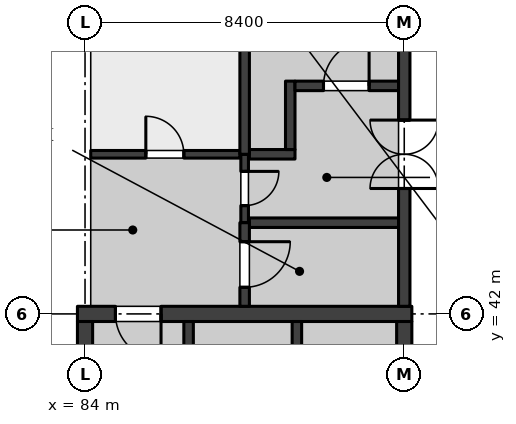
"""IFC4 building model, lengths in metres.
Left out: names, types, materials, properties, quantities, classifications, styles, units other than length and angle.
Written with IfcOpenShell. Run it as: python <this file> out.ifc"""

import sys

from ifc_helpers import new_model, si_unit, direction, frame, frame_2d, origin, place, context, subcontext, project, spatial, rectangle, extrude, element, fill, save


model = new_model("IFC4")
c1 = context("Model", 3, precision=1e-05, world=origin(), true_north=direction((0.0, 1.0)))
c2 = subcontext(c1, "Body", "Model", "MODEL_VIEW")
j1 = project(units=[si_unit("LENGTHUNIT", "METRE"), si_unit("PLANEANGLEUNIT", "RADIAN")], contexts=[c1])
p1 = place(None, origin())
s1 = spatial("IfcSite", under=j1, at=p1, CompositionType="ELEMENT")
p2 = place(p1, origin())
s2 = spatial("IfcBuilding", under=s1, at=p2, CompositionType="ELEMENT")
p3 = place(p2, frame((0.0, 0.0, 5.4)))
s3 = spatial("IfcBuildingStorey", under=s2, at=p3, CompositionType="ELEMENT", Elevation=5.4)
p4 = place(p3, frame((83.8, 42.0, 0.0), z_axis=(0.0, 0.0, 1.0), x_axis=(1.0, 0.0, 0.0)))
e1 = element("IfcWall", 1, at=p4, inside=s3, PredefinedType="SHEAR", context=c2, shape_type="SweptSolid", body=[
    extrude(rectangle(XDim=8.8, YDim=0.4, at=frame_2d((4.4, 0.0))), origin(), (0.0, 0.0, 1.0), 4.25),
])
p5 = place(p4, frame((1.0, 0.0, 0.0)))
e2 = element("IfcOpeningElement", 2, at=p5, cuts=e1, PredefinedType="OPENING", context=c2, shape_type="SweptSolid", body=[
    extrude(rectangle(XDim=1.2, YDim=2.1, at=frame_2d((0.6, 1.05))), frame((0.0, 0.21, 0.0), z_axis=(0.0, -1.0, 0.0), x_axis=(1.0, 0.0, 0.0)), (0.0, 0.0, 1.0), 0.42),
])
for number, where, z_axis, x_axis in (
    (3, (84.0, 33.8, 0.0), (0.0, 0.0, 1.0), (0.0, 1.0, 0.0)),
    (4, (92.4, 33.8, 0.0), (0.0, 0.0, 1.0), (0.0, 1.0, 0.0)),
):
    element("IfcWall", number, at=place(p3, frame(where, z_axis=z_axis, x_axis=x_axis)), inside=s3, PredefinedType="SHEAR", context=c2, shape_type="SweptSolid", body=[
        extrude(rectangle(XDim=8.0, YDim=0.4, at=frame_2d((4.0, 0.0))), origin(), (0.0, 0.0, 1.0), 4.25),
    ])
p6 = place(p3, frame((86.725, 39.0, 0.0), z_axis=(0.0, 0.0, 1.0), x_axis=(0.0, 1.0, 0.0)))
e5 = element("IfcWall", 5, at=p6, inside=s3, PredefinedType="SOLIDWALL", context=c2, shape_type="SweptSolid", body=[
    extrude(rectangle(XDim=2.8, YDim=0.25, at=frame_2d((1.4, 0.0))), origin(), (0.0, 0.0, 1.0), 4.25),
])
p7 = place(p3, frame((89.575, 39.25, 0.0), z_axis=(0.0, 0.0, 1.0), x_axis=(0.0, 1.0, 0.0)))
e6 = element("IfcWall", 6, at=p7, inside=s3, PredefinedType="SOLIDWALL", context=c2, shape_type="SweptSolid", body=[
    extrude(rectangle(XDim=2.55, YDim=0.25, at=frame_2d((1.275, 0.0))), origin(), (0.0, 0.0, 1.0), 4.25),
])
p8 = place(p2, origin())
s4 = spatial("IfcBuildingStorey", under=s2, at=p8, CompositionType="ELEMENT", Elevation=0.0)
p9 = place(p8, frame((84.0, 42.2, 0.0), z_axis=(0.0, 0.0, 1.0), x_axis=(0.0, 1.0, 0.0)))
e7 = element("IfcWall", 7, at=p9, inside=s4, PredefinedType="PARTITIONING", context=c2, shape_type="SweptSolid", body=[
    extrude(rectangle(XDim=4.0, YDim=0.2, at=frame_2d((2.0, 0.0))), origin(), (0.0, 0.0, 1.0), 18.77),
])
p10 = place(p9, frame((1.5, 0.0, 0.0)))
e8 = element("IfcOpeningElement", 8, at=p10, cuts=e7, PredefinedType="OPENING", context=c2, shape_type="SweptSolid", body=[
    extrude(rectangle(XDim=1.0, YDim=2.4, at=frame_2d((0.5, 1.2))), frame((0.0, 0.11, 0.0), z_axis=(0.0, -1.0, 0.0), x_axis=(1.0, 0.0, 0.0)), (0.0, 0.0, 1.0), 0.22),
])
p11 = place(p8, frame((84.0, 46.2, 0.0), z_axis=(0.0, 0.0, 1.0), x_axis=(0.0, 1.0, 0.0)))
e9 = element("IfcWall", 9, at=p11, inside=s4, PredefinedType="PARTITIONING", context=c2, shape_type="SweptSolid", body=[
    extrude(rectangle(XDim=2.4, YDim=0.125, at=frame_2d((1.2, 0.0))), origin(), (0.0, 0.0, 1.0), 18.77),
])
p12 = place(p8, frame((84.0, 48.6, 0.0), z_axis=(0.0, 0.0, 1.0), x_axis=(0.0, 1.0, 0.0)))
e10 = element("IfcWall", 10, at=p12, inside=s4, PredefinedType="PARTITIONING", context=c2, shape_type="SweptSolid", body=[
    extrude(rectangle(XDim=1.35, YDim=0.125, at=frame_2d((0.675, 0.0))), origin(), (0.0, 0.0, 1.0), 18.77),
])
p13 = place(p3, frame((88.2, 44.4, 0.0), z_axis=(0.0, 0.0, 1.0), x_axis=(0.0, 1.0, 0.0)))
e11 = element("IfcWall", 11, at=p13, inside=s3, PredefinedType="PARTITIONING", context=c2, shape_type="SweptSolid", body=[
    extrude(rectangle(XDim=1.8, YDim=0.2, at=frame_2d((0.9, 0.0))), origin(), (0.0, 0.0, 1.0), 4.25),
])
p14 = place(p13, frame((0.45, 0.0, 0.0)))
e12 = element("IfcOpeningElement", 12, at=p14, cuts=e11, PredefinedType="OPENING", context=c2, shape_type="SweptSolid", body=[
    extrude(rectangle(XDim=0.9, YDim=2.1, at=frame_2d((0.45, 1.05))), frame((0.0, 0.11, 0.0), z_axis=(0.0, -1.0, 0.0), x_axis=(1.0, 0.0, 0.0)), (0.0, 0.0, 1.0), 0.22),
])
p15 = place(p3, frame((88.325, 46.2, 0.0), z_axis=(0.0, 0.0, 1.0), x_axis=(1.0, 0.0, 0.0)))
e13 = element("IfcWall", 13, at=p15, inside=s3, PredefinedType="PARTITIONING", context=c2, shape_type="SweptSolid", body=[
    extrude(rectangle(XDim=1.2, YDim=0.25, at=frame_2d((0.6, 0.0))), origin(), (0.0, 0.0, 1.0), 4.25),
])
p16 = place(p3, frame((89.4, 46.325, 0.0), z_axis=(0.0, 0.0, 1.0), x_axis=(0.0, 1.0, 0.0)))
e14 = element("IfcWall", 14, at=p16, inside=s3, PredefinedType="PARTITIONING", context=c2, shape_type="SweptSolid", body=[
    extrude(rectangle(XDim=1.8, YDim=0.25, at=frame_2d((0.9, 0.0))), origin(), (0.0, 0.0, 1.0), 4.25),
])
p17 = place(p3, frame((89.525, 48.0, 0.0), z_axis=(0.0, 0.0, 1.0), x_axis=(1.0, 0.0, 0.0)))
e15 = element("IfcWall", 15, at=p17, inside=s3, PredefinedType="PARTITIONING", context=c2, shape_type="SweptSolid", body=[
    extrude(rectangle(XDim=2.725, YDim=0.25, at=frame_2d((1.363, 0.0))), origin(), (0.0, 0.0, 1.0), 4.25),
])
p18 = place(p17, frame((0.75, 0.0, 0.0)))
e16 = element("IfcOpeningElement", 16, at=p18, cuts=e15, PredefinedType="OPENING", context=c2, shape_type="SweptSolid", body=[
    extrude(rectangle(XDim=1.2, YDim=2.4, at=frame_2d((0.6, 1.2))), frame((0.0, 0.135, 0.0), z_axis=(0.0, -1.0, 0.0), x_axis=(1.0, 0.0, 0.0)), (0.0, 0.0, 1.0), 0.27),
])
p19 = place(p3, frame((88.325, 44.4, 0.0), z_axis=(0.0, 0.0, 1.0), x_axis=(1.0, 0.0, 0.0)))
e17 = element("IfcWall", 17, at=p19, inside=s3, PredefinedType="PARTITIONING", context=c2, shape_type="SweptSolid", body=[
    extrude(rectangle(XDim=3.925, YDim=0.25, at=frame_2d((1.962, 0.0))), origin(), (0.0, 0.0, 1.0), 4.25),
])
p20 = place(p3, frame((88.2, 42.2, 0.0), z_axis=(0.0, 0.0, 1.0), x_axis=(0.0, 1.0, 0.0)))
e18 = element("IfcWall", 18, at=p20, inside=s3, PredefinedType="PARTITIONING", context=c2, shape_type="SweptSolid", body=[
    extrude(rectangle(XDim=2.2, YDim=0.25, at=frame_2d((1.1, 0.0))), origin(), (0.0, 0.0, 1.0), 4.25),
])
p21 = place(p20, frame((0.5, 0.0, 0.0)))
e19 = element("IfcOpeningElement", 19, at=p21, cuts=e18, PredefinedType="OPENING", context=c2, shape_type="SweptSolid", body=[
    extrude(rectangle(XDim=1.2, YDim=2.4, at=frame_2d((0.6, 1.2))), frame((0.0, 0.135, 0.0), z_axis=(0.0, -1.0, 0.0), x_axis=(1.0, 0.0, 0.0)), (0.0, 0.0, 1.0), 0.27),
])
p22 = place(p3, frame((84.15, 46.2, 0.0), z_axis=(0.0, 0.0, 1.0), x_axis=(1.0, 0.0, 0.0)))
e20 = element("IfcWall", 20, at=p22, inside=s3, PredefinedType="PARTITIONING", context=c2, shape_type="SweptSolid", body=[
    extrude(rectangle(XDim=3.925, YDim=0.2, at=frame_2d((1.962, 0.0))), origin(), (0.0, 0.0, 1.0), 4.25),
])
p23 = place(p22, frame((1.45, 0.0, 0.0)))
e21 = element("IfcOpeningElement", 21, at=p23, cuts=e20, PredefinedType="OPENING", context=c2, shape_type="SweptSolid", body=[
    extrude(rectangle(XDim=1.0, YDim=2.4, at=frame_2d((0.5, 1.2))), frame((0.0, 0.11, 0.0), z_axis=(0.0, -1.0, 0.0), x_axis=(1.0, 0.0, 0.0)), (0.0, 0.0, 1.0), 0.22),
])
p24 = place(p3, frame((88.2, 46.2, 0.0), z_axis=(0.0, 0.0, 1.0), x_axis=(0.0, 1.0, 0.0)))
e22 = element("IfcWall", 22, at=p24, inside=s3, PredefinedType="PARTITIONING", context=c2, shape_type="SweptSolid", body=[
    extrude(rectangle(XDim=4.2, YDim=0.25, at=frame_2d((2.1, 0.0))), origin(), (0.0, 0.0, 1.0), 4.25),
])
p25 = place(p3, frame((92.4, 42.2, 0.0), z_axis=(0.0, 0.0, 1.0), x_axis=(0.0, 1.0, 0.0)))
e23 = element("IfcWall", 23, at=p25, inside=s3, PredefinedType="SOLIDWALL", context=c2, shape_type="SweptSolid", body=[
    extrude(rectangle(XDim=7.87, YDim=0.3, at=frame_2d((3.935, 0.0))), origin(), (0.0, 0.0, 1.0), 4.5),
])
p26 = place(p25, frame((3.1, 0.0, 0.0)))
e24 = element("IfcOpeningElement", 24, at=p26, cuts=e23, PredefinedType="OPENING", context=c2, shape_type="SweptSolid", body=[
    extrude(rectangle(XDim=1.8, YDim=2.4, at=frame_2d((0.9, 1.2))), frame((0.0, 0.16, 0.0), z_axis=(0.0, -1.0, 0.0), x_axis=(1.0, 0.0, 0.0)), (0.0, 0.0, 1.0), 0.32),
])
p27 = place(p5, frame((1.2, 0.0, 0.0), z_axis=(0.0, 0.0, 1.0), x_axis=(-1.0, 0.0, 0.0)))
e25 = element("IfcDoor", 25, at=p27, inside=s3, OperationType="SINGLE_SWING_RIGHT", PredefinedType="DOOR", context=c2, shape_type="SweptSolid", body=[
    extrude(rectangle(XDim=1.2, YDim=2.1, at=frame_2d((0.6, 1.05))), frame((0.0, 0.035, 0.0), z_axis=(0.0, -1.0, 0.0), x_axis=(1.0, 0.0, 0.0)), (0.0, 0.0, 1.0), 0.07),
])
fill(e2, e25)
p28 = place(p14, frame((0.9, 0.0, 0.0), z_axis=(0.0, 0.0, 1.0), x_axis=(-1.0, 0.0, 0.0)))
e26 = element("IfcDoor", 26, at=p28, inside=s3, OperationType="SINGLE_SWING_RIGHT", PredefinedType="DOOR", context=c2, shape_type="SweptSolid", body=[
    extrude(rectangle(XDim=0.9, YDim=2.1, at=frame_2d((0.45, 1.05))), frame((0.0, 0.03, 0.0), z_axis=(0.0, -1.0, 0.0), x_axis=(1.0, 0.0, 0.0)), (0.0, 0.0, 1.0), 0.06),
])
fill(e12, e26)
p29 = place(p18, origin())
e27 = element("IfcDoor", 27, at=p29, inside=s3, OperationType="SINGLE_SWING_LEFT", PredefinedType="DOOR", context=c2, shape_type="SweptSolid", body=[
    extrude(rectangle(XDim=1.2, YDim=2.4, at=frame_2d((0.6, 1.2))), frame((0.0, 0.05, 0.0), z_axis=(0.0, -1.0, 0.0), x_axis=(1.0, 0.0, 0.0)), (0.0, 0.0, 1.0), 0.1),
])
fill(e16, e27)
p30 = place(p21, frame((1.2, 0.0, 0.0), z_axis=(0.0, 0.0, 1.0), x_axis=(-1.0, 0.0, 0.0)))
e28 = element("IfcDoor", 28, at=p30, inside=s3, OperationType="SINGLE_SWING_RIGHT", PredefinedType="DOOR", context=c2, shape_type="SweptSolid", body=[
    extrude(rectangle(XDim=1.2, YDim=2.4, at=frame_2d((0.6, 1.2))), frame((0.0, 0.05, 0.0), z_axis=(0.0, -1.0, 0.0), x_axis=(1.0, 0.0, 0.0)), (0.0, 0.0, 1.0), 0.1),
])
fill(e19, e28)
p31 = place(p23, origin())
e29 = element("IfcDoor", 29, at=p31, inside=s3, OperationType="SINGLE_SWING_RIGHT", PredefinedType="DOOR", context=c2, shape_type="SweptSolid", body=[
    extrude(rectangle(XDim=1.0, YDim=2.4, at=frame_2d((0.5, 1.2))), frame((0.0, 0.035, 0.0), z_axis=(0.0, -1.0, 0.0), x_axis=(1.0, 0.0, 0.0)), (0.0, 0.0, 1.0), 0.07),
])
fill(e21, e29)
p32 = place(p26, frame((1.8, 0.0, 0.0), z_axis=(0.0, 0.0, 1.0), x_axis=(-1.0, 0.0, 0.0)))
e30 = element("IfcDoor", 30, at=p32, inside=s3, OperationType="DOUBLE_DOOR_DOUBLE_SWING", PredefinedType="DOOR", context=c2, shape_type="SweptSolid", body=[
    extrude(rectangle(XDim=1.8, YDim=2.4, at=frame_2d((0.9, 1.2))), frame((0.0, 0.025, 0.0), z_axis=(0.0, -1.0, 0.0), x_axis=(1.0, 0.0, 0.0)), (0.0, 0.0, 1.0), 0.05),
])
fill(e24, e30)
save(model, sys.argv[1])
